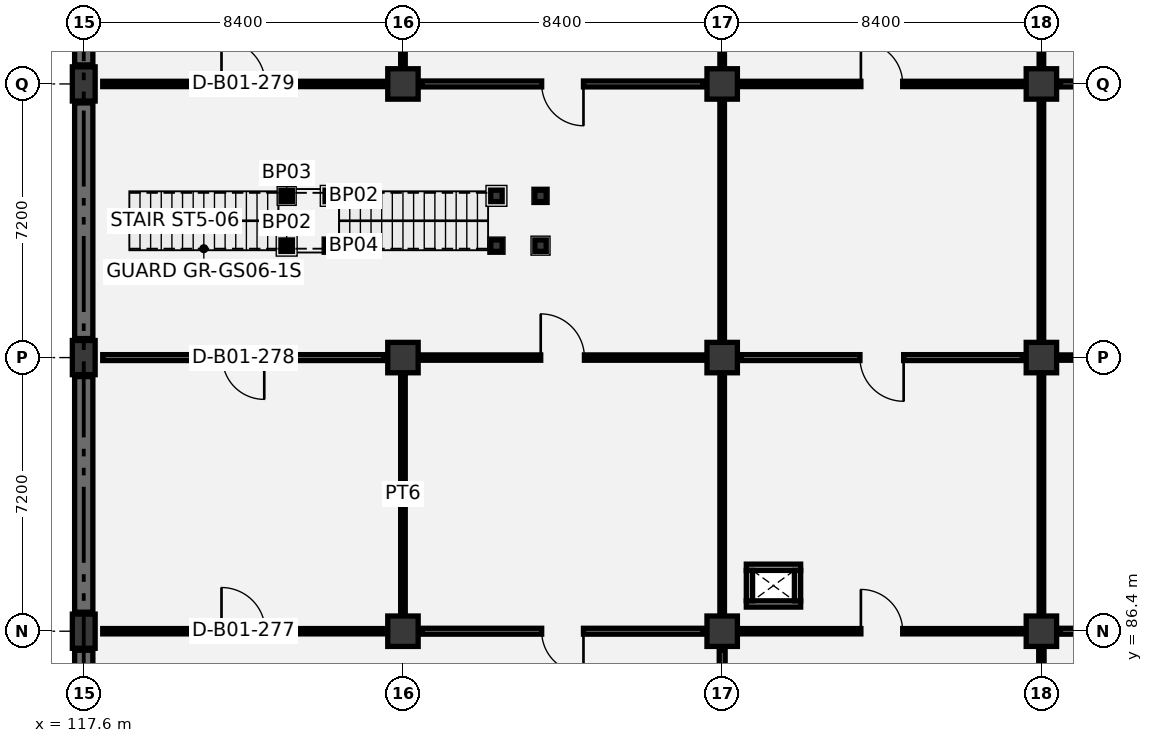
"""IFC4 building model, lengths in metres.
Left out: names, types, materials, properties, quantities, classifications, styles, units other than length and angle.
Written with IfcOpenShell. Run it as: python <this file> out.ifc"""

import sys

from ifc_helpers import new_model, si_unit, direction, frame, frame_2d, origin, origin_2d, place, context, subcontext, project, spatial, rectangle, i_section, extrude, element, fill, save


model = new_model("IFC4")
c1 = context("Model", 3, precision=1e-05, world=origin(), true_north=direction((0.0, 1.0)))
c2 = subcontext(c1, "Body", "Model", "MODEL_VIEW")
j1 = project(units=[si_unit("LENGTHUNIT", "METRE"), si_unit("PLANEANGLEUNIT", "RADIAN")], contexts=[c1])
p1 = place(None, origin())
s1 = spatial("IfcSite", under=j1, at=p1, CompositionType="ELEMENT")
p2 = place(p1, origin())
s2 = spatial("IfcBuilding", under=s1, at=p2, CompositionType="ELEMENT")
p3 = place(p2, frame((0.0, 0.0, -4.8)))
s3 = spatial("IfcBuildingStorey", under=s2, at=p3, CompositionType="ELEMENT", Elevation=-4.8)
for number, where, z_axis, x_axis in (
    (1, (117.6, 86.4, 0.0), (0.0, 0.0, 1.0), (1.0, 0.0, 0.0)),
    (2, (117.6, 93.6, 0.0), (0.0, 0.0, 1.0), (1.0, 0.0, 0.0)),
    (3, (117.6, 100.8, 0.0), (0.0, 0.0, 1.0), (1.0, 0.0, 0.0)),
):
    element("IfcColumn", number, at=place(p3, frame(where, z_axis=z_axis, x_axis=x_axis)), inside=s3, PredefinedType="COLUMN", context=c2, shape_type="SweptSolid", body=[
        extrude(rectangle(XDim=0.6, YDim=0.9, at=origin_2d()), origin(), (0.0, 0.0, 1.0), 4.8),
    ])
for number, where, z_axis, x_axis in (
    (4, (126.0, 86.4, 0.0), (0.0, 0.0, 1.0), (1.0, 0.0, 0.0)),
    (5, (126.0, 93.6, 0.0), (0.0, 0.0, 1.0), (1.0, 0.0, 0.0)),
    (6, (126.0, 100.8, 0.0), (0.0, 0.0, 1.0), (1.0, 0.0, 0.0)),
    (7, (134.4, 86.4, 0.0), (0.0, 0.0, 1.0), (1.0, 0.0, 0.0)),
    (8, (134.4, 93.6, 0.0), (0.0, 0.0, 1.0), (1.0, 0.0, 0.0)),
    (9, (134.4, 100.8, 0.0), (0.0, 0.0, 1.0), (1.0, 0.0, 0.0)),
    (10, (142.8, 86.4, 0.0), (0.0, 0.0, 1.0), (1.0, 0.0, 0.0)),
    (11, (142.8, 93.6, 0.0), (0.0, 0.0, 1.0), (1.0, 0.0, 0.0)),
    (12, (142.8, 100.8, 0.0), (0.0, 0.0, 1.0), (1.0, 0.0, 0.0)),
):
    element("IfcColumn", number, at=place(p3, frame(where, z_axis=z_axis, x_axis=x_axis)), inside=s3, PredefinedType="COLUMN", context=c2, shape_type="SweptSolid", body=[
        extrude(rectangle(XDim=0.8, YDim=0.8, at=origin_2d()), origin(), (0.0, 0.0, 1.0), 4.8),
    ])
for number, where, z_axis, x_axis in (
    (13, (122.94, 96.545, 0.0), (0.0, 0.0, 1.0), (1.0, 0.0, 0.0)),
    (14, (124.1, 96.545, 0.0), (0.0, 0.0, 1.0), (1.0, 0.0, 0.0)),
    (15, (122.94, 97.855, 0.0), (0.0, 0.0, 1.0), (1.0, 0.0, 0.0)),
    (16, (124.1, 97.855, 0.0), (0.0, 0.0, 1.0), (1.0, 0.0, 0.0)),
):
    element("IfcColumn", number, at=place(p3, frame(where, z_axis=z_axis, x_axis=x_axis)), inside=s3, PredefinedType="COLUMN", context=c2, shape_type="SweptSolid", body=[
        extrude(i_section(OverallWidth=0.3, OverallDepth=0.3, WebThickness=0.011, FlangeThickness=0.019, FilletRadius=0.027, at=origin_2d()), origin(), (0.0, 0.0, 1.0), 2.22),
    ])
for number, where, z_axis, x_axis in (
    (17, (128.46, 96.545, 0.0), (0.0, 0.0, 1.0), (1.0, 0.0, 0.0)),
    (18, (129.62, 96.545, 0.0), (0.0, 0.0, 1.0), (1.0, 0.0, 0.0)),
    (19, (128.46, 97.855, 0.0), (0.0, 0.0, 1.0), (1.0, 0.0, 0.0)),
    (20, (129.62, 97.855, 0.0), (0.0, 0.0, 1.0), (1.0, 0.0, 0.0)),
):
    element("IfcColumn", number, at=place(p3, frame(where, z_axis=z_axis, x_axis=x_axis)), inside=s3, PredefinedType="COLUMN", context=c2, shape_type="SweptSolid", body=[
        extrude(i_section(OverallWidth=0.3, OverallDepth=0.3, WebThickness=0.011, FlangeThickness=0.019, FilletRadius=0.027, at=origin_2d()), origin(), (0.0, 0.0, 1.0), 4.6),
    ])
p4 = place(p3, frame((117.6, 79.7, 0.0), z_axis=(0.0, 0.0, 1.0), x_axis=(0.0, 1.0, 0.0)))
e21 = element("IfcWall", 21, at=p4, inside=s3, PredefinedType="USERDEFINED", context=c2, shape_type="SweptSolid", body=[
    extrude(rectangle(XDim=6.2, YDim=0.48, at=frame_2d((3.1, 0.0))), origin(), (0.0, 0.0, 1.0), 4.575),
])
p5 = place(p3, frame((117.6, 86.9, 0.0), z_axis=(0.0, 0.0, 1.0), x_axis=(0.0, 1.0, 0.0)))
e22 = element("IfcWall", 22, at=p5, inside=s3, PredefinedType="USERDEFINED", context=c2, shape_type="SweptSolid", body=[
    extrude(rectangle(XDim=6.2, YDim=0.48, at=frame_2d((3.1, 0.0))), origin(), (0.0, 0.0, 1.0), 4.575),
])
for number, where, z_axis, x_axis in (
    (23, (117.6, 94.1, 0.0), (0.0, 0.0, 1.0), (0.0, 1.0, 0.0)),
    (24, (117.6, 101.3, 0.0), (0.0, 0.0, 1.0), (0.0, 1.0, 0.0)),
):
    element("IfcWall", number, at=place(p3, frame(where, z_axis=z_axis, x_axis=x_axis)), inside=s3, PredefinedType="USERDEFINED", context=c2, shape_type="SweptSolid", body=[
        extrude(rectangle(XDim=6.2, YDim=0.48, at=frame_2d((3.1, 0.0))), origin(), (0.0, 0.0, 1.0), 4.575),
    ])
for number, where, z_axis, x_axis in (
    (25, (135.035, 87.117, 0.0), (0.0, 0.0, 1.0), (1.0, 0.0, 0.0)),
    (26, (135.035, 88.083, 0.0), (0.0, 0.0, 1.0), (1.0, 0.0, 0.0)),
):
    element("IfcWall", number, at=place(p3, frame(where, z_axis=z_axis, x_axis=x_axis)), inside=s3, PredefinedType="PARTITIONING", context=c2, shape_type="SweptSolid", body=[
        extrude(rectangle(XDim=1.43, YDim=0.165, at=frame_2d((0.715, 0.0))), origin(), (0.0, 0.0, 1.0), 4.45),
    ])
for number, where, z_axis, x_axis in (
    (27, (135.117, 87.2, 0.0), (0.0, 0.0, 1.0), (0.0, 1.0, 0.0)),
    (28, (136.383, 87.2, 0.0), (0.0, 0.0, 1.0), (0.0, 1.0, 0.0)),
):
    element("IfcWall", number, at=place(p3, frame(where, z_axis=z_axis, x_axis=x_axis)), inside=s3, PredefinedType="PARTITIONING", context=c2, shape_type="SweptSolid", body=[
        extrude(rectangle(XDim=0.8, YDim=0.165, at=frame_2d((0.4, 0.0))), origin(), (0.0, 0.0, 1.0), 4.45),
    ])
p6 = place(p3, frame((118.1, 86.4, 0.0), z_axis=(0.0, 0.0, 1.0), x_axis=(1.0, 0.0, 0.0)))
e29 = element("IfcWall", 29, at=p6, inside=s3, PredefinedType="PARTITIONING", context=c2, shape_type="SweptSolid", body=[
    extrude(rectangle(XDim=7.4, YDim=0.14, at=frame_2d((3.7, 0.0))), origin(), (0.0, 0.0, 1.0), 3.545),
])
p7 = place(p6, frame((3.125, 0.0, 0.0)))
e30 = element("IfcOpeningElement", 30, at=p7, cuts=e29, PredefinedType="OPENING", context=c2, shape_type="SweptSolid", body=[
    extrude(rectangle(XDim=1.15, YDim=2.1, at=frame_2d((0.575, 1.05))), frame((0.0, 0.08, 0.0), z_axis=(0.0, -1.0, 0.0), x_axis=(1.0, 0.0, 0.0)), (0.0, 0.0, 1.0), 0.16),
])
p8 = place(p3, frame((126.0, 86.9, 0.0), z_axis=(0.0, 0.0, 1.0), x_axis=(0.0, 1.0, 0.0)))
e31 = element("IfcWall", 31, at=p8, inside=s3, PredefinedType="PARTITIONING", context=c2, shape_type="SweptSolid", body=[
    extrude(rectangle(XDim=6.2, YDim=0.12, at=frame_2d((3.1, 0.0))), origin(), (0.0, 0.0, 1.0), 3.645),
])
p9 = place(p3, frame((118.1, 93.6, 0.0), z_axis=(0.0, 0.0, 1.0), x_axis=(1.0, 0.0, 0.0)))
e32 = element("IfcWall", 32, at=p9, inside=s3, PredefinedType="PARTITIONING", context=c2, shape_type="SweptSolid", body=[
    extrude(rectangle(XDim=7.4, YDim=0.155, at=frame_2d((3.7, 0.0))), origin(), (0.0, 0.0, 1.0), 3.545),
])
p10 = place(p9, frame((3.15, 0.0, 0.0)))
e33 = element("IfcOpeningElement", 33, at=p10, cuts=e32, PredefinedType="OPENING", context=c2, shape_type="SweptSolid", body=[
    extrude(rectangle(XDim=1.1, YDim=2.1, at=frame_2d((0.55, 1.05))), frame((0.0, 0.087, 0.0), z_axis=(0.0, -1.0, 0.0), x_axis=(1.0, 0.0, 0.0)), (0.0, 0.0, 1.0), 0.175),
])
p11 = place(p3, frame((118.1, 100.8, 0.0), z_axis=(0.0, 0.0, 1.0), x_axis=(1.0, 0.0, 0.0)))
e34 = element("IfcWall", 34, at=p11, inside=s3, PredefinedType="PARTITIONING", context=c2, shape_type="SweptSolid", body=[
    extrude(rectangle(XDim=7.4, YDim=0.14, at=frame_2d((3.7, 0.0))), origin(), (0.0, 0.0, 1.0), 3.545),
])
p12 = place(p11, frame((3.125, 0.0, 0.0)))
e35 = element("IfcOpeningElement", 35, at=p12, cuts=e34, PredefinedType="OPENING", context=c2, shape_type="SweptSolid", body=[
    extrude(rectangle(XDim=1.15, YDim=2.1, at=frame_2d((0.575, 1.05))), frame((0.0, 0.08, 0.0), z_axis=(0.0, -1.0, 0.0), x_axis=(1.0, 0.0, 0.0)), (0.0, 0.0, 1.0), 0.16),
])
p13 = place(p3, frame((126.0, 101.3, 0.0), z_axis=(0.0, 0.0, 1.0), x_axis=(0.0, 1.0, 0.0)))
e36 = element("IfcWall", 36, at=p13, inside=s3, PredefinedType="PARTITIONING", context=c2, shape_type="SweptSolid", body=[
    extrude(rectangle(XDim=6.2, YDim=0.12, at=frame_2d((3.1, 0.0))), origin(), (0.0, 0.0, 1.0), 3.645),
])
p14 = place(p3, frame((134.4, 79.7, 0.0), z_axis=(0.0, 0.0, 1.0), x_axis=(0.0, 1.0, 0.0)))
e37 = element("IfcWall", 37, at=p14, inside=s3, PredefinedType="PARTITIONING", context=c2, shape_type="SweptSolid", body=[
    extrude(rectangle(XDim=6.2, YDim=0.155, at=frame_2d((3.1, 0.0))), origin(), (0.0, 0.0, 1.0), 3.645),
])
p15 = place(p14, frame((2.525, 0.0, 0.0)))
e38 = element("IfcOpeningElement", 38, at=p15, cuts=e37, PredefinedType="OPENING", context=c2, shape_type="SweptSolid", body=[
    extrude(rectangle(XDim=1.15, YDim=2.1, at=frame_2d((0.575, 1.05))), frame((0.0, 0.087, 0.0), z_axis=(0.0, -1.0, 0.0), x_axis=(1.0, 0.0, 0.0)), (0.0, 0.0, 1.0), 0.175),
])
p16 = place(p3, frame((126.5, 86.4, 0.0), z_axis=(0.0, 0.0, 1.0), x_axis=(1.0, 0.0, 0.0)))
e39 = element("IfcWall", 39, at=p16, inside=s3, PredefinedType="PARTITIONING", context=c2, shape_type="SweptSolid", body=[
    extrude(rectangle(XDim=7.4, YDim=0.155, at=frame_2d((3.7, 0.0))), origin(), (0.0, 0.0, 1.0), 3.545),
])
p17 = place(p16, frame((3.15, 0.0, 0.0)))
e40 = element("IfcOpeningElement", 40, at=p17, cuts=e39, PredefinedType="OPENING", context=c2, shape_type="SweptSolid", body=[
    extrude(rectangle(XDim=1.1, YDim=2.1, at=frame_2d((0.55, 1.05))), frame((0.0, 0.087, 0.0), z_axis=(0.0, -1.0, 0.0), x_axis=(1.0, 0.0, 0.0)), (0.0, 0.0, 1.0), 0.175),
])
p18 = place(p3, frame((134.4, 86.9, 0.0), z_axis=(0.0, 0.0, 1.0), x_axis=(0.0, 1.0, 0.0)))
e41 = element("IfcWall", 41, at=p18, inside=s3, PredefinedType="PARTITIONING", context=c2, shape_type="SweptSolid", body=[
    extrude(rectangle(XDim=6.2, YDim=0.12, at=frame_2d((3.1, 0.0))), origin(), (0.0, 0.0, 1.0), 3.645),
])
p19 = place(p3, frame((126.5, 93.6, 0.0), z_axis=(0.0, 0.0, 1.0), x_axis=(1.0, 0.0, 0.0)))
e42 = element("IfcWall", 42, at=p19, inside=s3, PredefinedType="PARTITIONING", context=c2, shape_type="SweptSolid", body=[
    extrude(rectangle(XDim=7.4, YDim=0.14, at=frame_2d((3.7, 0.0))), origin(), (0.0, 0.0, 1.0), 3.545),
])
p20 = place(p19, frame((3.125, 0.0, 0.0)))
e43 = element("IfcOpeningElement", 43, at=p20, cuts=e42, PredefinedType="OPENING", context=c2, shape_type="SweptSolid", body=[
    extrude(rectangle(XDim=1.15, YDim=2.1, at=frame_2d((0.575, 1.05))), frame((0.0, 0.08, 0.0), z_axis=(0.0, -1.0, 0.0), x_axis=(1.0, 0.0, 0.0)), (0.0, 0.0, 1.0), 0.16),
])
p21 = place(p3, frame((134.4, 94.1, 0.0), z_axis=(0.0, 0.0, 1.0), x_axis=(0.0, 1.0, 0.0)))
e44 = element("IfcWall", 44, at=p21, inside=s3, PredefinedType="PARTITIONING", context=c2, shape_type="SweptSolid", body=[
    extrude(rectangle(XDim=6.2, YDim=0.12, at=frame_2d((3.1, 0.0))), origin(), (0.0, 0.0, 1.0), 3.645),
])
p22 = place(p3, frame((126.5, 100.8, 0.0), z_axis=(0.0, 0.0, 1.0), x_axis=(1.0, 0.0, 0.0)))
e45 = element("IfcWall", 45, at=p22, inside=s3, PredefinedType="PARTITIONING", context=c2, shape_type="SweptSolid", body=[
    extrude(rectangle(XDim=7.4, YDim=0.155, at=frame_2d((3.7, 0.0))), origin(), (0.0, 0.0, 1.0), 3.545),
])
p23 = place(p22, frame((3.15, 0.0, 0.0)))
e46 = element("IfcOpeningElement", 46, at=p23, cuts=e45, PredefinedType="OPENING", context=c2, shape_type="SweptSolid", body=[
    extrude(rectangle(XDim=1.1, YDim=2.1, at=frame_2d((0.55, 1.05))), frame((0.0, 0.087, 0.0), z_axis=(0.0, -1.0, 0.0), x_axis=(1.0, 0.0, 0.0)), (0.0, 0.0, 1.0), 0.175),
])
p24 = place(p3, frame((134.4, 101.3, 0.0), z_axis=(0.0, 0.0, 1.0), x_axis=(0.0, 1.0, 0.0)))
e47 = element("IfcWall", 47, at=p24, inside=s3, PredefinedType="PARTITIONING", context=c2, shape_type="SweptSolid", body=[
    extrude(rectangle(XDim=6.2, YDim=0.12, at=frame_2d((3.1, 0.0))), origin(), (0.0, 0.0, 1.0), 3.645),
])
p25 = place(p3, frame((142.8, 79.7, 0.0), z_axis=(0.0, 0.0, 1.0), x_axis=(0.0, 1.0, 0.0)))
e48 = element("IfcWall", 48, at=p25, inside=s3, PredefinedType="PARTITIONING", context=c2, shape_type="SweptSolid", body=[
    extrude(rectangle(XDim=6.2, YDim=0.14, at=frame_2d((3.1, 0.0))), origin(), (0.0, 0.0, 1.0), 3.645),
])
p26 = place(p25, frame((2.525, 0.0, 0.0)))
e49 = element("IfcOpeningElement", 49, at=p26, cuts=e48, PredefinedType="OPENING", context=c2, shape_type="SweptSolid", body=[
    extrude(rectangle(XDim=1.15, YDim=2.1, at=frame_2d((0.575, 1.05))), frame((0.0, 0.08, 0.0), z_axis=(0.0, -1.0, 0.0), x_axis=(1.0, 0.0, 0.0)), (0.0, 0.0, 1.0), 0.16),
])
p27 = place(p3, frame((134.9, 86.4, 0.0), z_axis=(0.0, 0.0, 1.0), x_axis=(1.0, 0.0, 0.0)))
e50 = element("IfcWall", 50, at=p27, inside=s3, PredefinedType="PARTITIONING", context=c2, shape_type="SweptSolid", body=[
    extrude(rectangle(XDim=7.4, YDim=0.14, at=frame_2d((3.7, 0.0))), origin(), (0.0, 0.0, 1.0), 3.545),
])
p28 = place(p27, frame((3.15, 0.0, 0.0)))
e51 = element("IfcOpeningElement", 51, at=p28, cuts=e50, PredefinedType="OPENING", context=c2, shape_type="SweptSolid", body=[
    extrude(rectangle(XDim=1.1, YDim=2.1, at=frame_2d((0.55, 1.05))), frame((0.0, 0.08, 0.0), z_axis=(0.0, -1.0, 0.0), x_axis=(1.0, 0.0, 0.0)), (0.0, 0.0, 1.0), 0.16),
])
p29 = place(p3, frame((142.8, 86.9, 0.0), z_axis=(0.0, 0.0, 1.0), x_axis=(0.0, 1.0, 0.0)))
e52 = element("IfcWall", 52, at=p29, inside=s3, PredefinedType="PARTITIONING", context=c2, shape_type="SweptSolid", body=[
    extrude(rectangle(XDim=6.2, YDim=0.12, at=frame_2d((3.1, 0.0))), origin(), (0.0, 0.0, 1.0), 3.645),
])
p30 = place(p3, frame((134.9, 93.6, 0.0), z_axis=(0.0, 0.0, 1.0), x_axis=(1.0, 0.0, 0.0)))
e53 = element("IfcWall", 53, at=p30, inside=s3, PredefinedType="PARTITIONING", context=c2, shape_type="SweptSolid", body=[
    extrude(rectangle(XDim=7.4, YDim=0.155, at=frame_2d((3.7, 0.0))), origin(), (0.0, 0.0, 1.0), 3.545),
])
p31 = place(p30, frame((3.125, 0.0, 0.0)))
e54 = element("IfcOpeningElement", 54, at=p31, cuts=e53, PredefinedType="OPENING", context=c2, shape_type="SweptSolid", body=[
    extrude(rectangle(XDim=1.15, YDim=2.1, at=frame_2d((0.575, 1.05))), frame((0.0, 0.087, 0.0), z_axis=(0.0, -1.0, 0.0), x_axis=(1.0, 0.0, 0.0)), (0.0, 0.0, 1.0), 0.175),
])
p32 = place(p3, frame((142.8, 94.1, 0.0), z_axis=(0.0, 0.0, 1.0), x_axis=(0.0, 1.0, 0.0)))
e55 = element("IfcWall", 55, at=p32, inside=s3, PredefinedType="PARTITIONING", context=c2, shape_type="SweptSolid", body=[
    extrude(rectangle(XDim=6.2, YDim=0.12, at=frame_2d((3.1, 0.0))), origin(), (0.0, 0.0, 1.0), 3.645),
])
p33 = place(p3, frame((134.9, 100.8, 0.0), z_axis=(0.0, 0.0, 1.0), x_axis=(1.0, 0.0, 0.0)))
e56 = element("IfcWall", 56, at=p33, inside=s3, PredefinedType="PARTITIONING", context=c2, shape_type="SweptSolid", body=[
    extrude(rectangle(XDim=7.4, YDim=0.14, at=frame_2d((3.7, 0.0))), origin(), (0.0, 0.0, 1.0), 3.545),
])
p34 = place(p33, frame((3.15, 0.0, 0.0)))
e57 = element("IfcOpeningElement", 57, at=p34, cuts=e56, PredefinedType="OPENING", context=c2, shape_type="SweptSolid", body=[
    extrude(rectangle(XDim=1.1, YDim=2.1, at=frame_2d((0.55, 1.05))), frame((0.0, 0.08, 0.0), z_axis=(0.0, -1.0, 0.0), x_axis=(1.0, 0.0, 0.0)), (0.0, 0.0, 1.0), 0.16),
])
p35 = place(p3, frame((142.8, 101.3, 0.0), z_axis=(0.0, 0.0, 1.0), x_axis=(0.0, 1.0, 0.0)))
e58 = element("IfcWall", 58, at=p35, inside=s3, PredefinedType="PARTITIONING", context=c2, shape_type="SweptSolid", body=[
    extrude(rectangle(XDim=6.2, YDim=0.12, at=frame_2d((3.1, 0.0))), origin(), (0.0, 0.0, 1.0), 3.645),
])
p36 = place(p3, frame((143.3, 86.4, 0.0), z_axis=(0.0, 0.0, 1.0), x_axis=(1.0, 0.0, 0.0)))
e59 = element("IfcWall", 59, at=p36, inside=s3, PredefinedType="PARTITIONING", context=c2, shape_type="SweptSolid", body=[
    extrude(rectangle(XDim=7.4, YDim=0.155, at=frame_2d((3.7, 0.0))), origin(), (0.0, 0.0, 1.0), 3.545),
])
p37 = place(p36, frame((3.15, 0.0, 0.0)))
e60 = element("IfcOpeningElement", 60, at=p37, cuts=e59, PredefinedType="OPENING", context=c2, shape_type="SweptSolid", body=[
    extrude(rectangle(XDim=1.1, YDim=2.1, at=frame_2d((0.55, 1.05))), frame((0.0, 0.087, 0.0), z_axis=(0.0, -1.0, 0.0), x_axis=(1.0, 0.0, 0.0)), (0.0, 0.0, 1.0), 0.175),
])
p38 = place(p3, frame((143.3, 93.6, 0.0), z_axis=(0.0, 0.0, 1.0), x_axis=(1.0, 0.0, 0.0)))
e61 = element("IfcWall", 61, at=p38, inside=s3, PredefinedType="PARTITIONING", context=c2, shape_type="SweptSolid", body=[
    extrude(rectangle(XDim=7.4, YDim=0.14, at=frame_2d((3.7, 0.0))), origin(), (0.0, 0.0, 1.0), 3.545),
])
p39 = place(p38, frame((3.125, 0.0, 0.0)))
e62 = element("IfcOpeningElement", 62, at=p39, cuts=e61, PredefinedType="OPENING", context=c2, shape_type="SweptSolid", body=[
    extrude(rectangle(XDim=1.15, YDim=2.1, at=frame_2d((0.575, 1.05))), frame((0.0, 0.08, 0.0), z_axis=(0.0, -1.0, 0.0), x_axis=(1.0, 0.0, 0.0)), (0.0, 0.0, 1.0), 0.16),
])
p40 = place(p3, frame((143.3, 100.8, 0.0), z_axis=(0.0, 0.0, 1.0), x_axis=(1.0, 0.0, 0.0)))
e63 = element("IfcWall", 63, at=p40, inside=s3, PredefinedType="PARTITIONING", context=c2, shape_type="SweptSolid", body=[
    extrude(rectangle(XDim=7.4, YDim=0.155, at=frame_2d((3.7, 0.0))), origin(), (0.0, 0.0, 1.0), 3.545),
])
p41 = place(p40, frame((3.15, 0.0, 0.0)))
e64 = element("IfcOpeningElement", 64, at=p41, cuts=e63, PredefinedType="OPENING", context=c2, shape_type="SweptSolid", body=[
    extrude(rectangle(XDim=1.1, YDim=2.1, at=frame_2d((0.55, 1.05))), frame((0.0, 0.087, 0.0), z_axis=(0.0, -1.0, 0.0), x_axis=(1.0, 0.0, 0.0)), (0.0, 0.0, 1.0), 0.175),
])
p42 = place(p7, origin())
e65 = element("IfcDoor", 65, at=p42, inside=s3, OperationType="SINGLE_SWING_LEFT", PredefinedType="DOOR", context=c2, shape_type="SweptSolid", body=[
    extrude(rectangle(XDim=1.15, YDim=2.1, at=frame_2d((0.575, 1.05))), frame((0.0, 0.025, 0.0), z_axis=(0.0, -1.0, 0.0), x_axis=(1.0, 0.0, 0.0)), (0.0, 0.0, 1.0), 0.05),
])
fill(e30, e65)
p43 = place(p10, frame((1.1, 0.0, 0.0), z_axis=(0.0, 0.0, 1.0), x_axis=(-1.0, 0.0, 0.0)))
e66 = element("IfcDoor", 66, at=p43, inside=s3, OperationType="SINGLE_SWING_LEFT", PredefinedType="DOOR", context=c2, shape_type="SweptSolid", body=[
    extrude(rectangle(XDim=1.1, YDim=2.1, at=frame_2d((0.55, 1.05))), frame((0.0, 0.025, 0.0), z_axis=(0.0, -1.0, 0.0), x_axis=(1.0, 0.0, 0.0)), (0.0, 0.0, 1.0), 0.05),
])
fill(e33, e66)
p44 = place(p12, origin())
e67 = element("IfcDoor", 67, at=p44, inside=s3, OperationType="SINGLE_SWING_LEFT", PredefinedType="DOOR", context=c2, shape_type="SweptSolid", body=[
    extrude(rectangle(XDim=1.15, YDim=2.1, at=frame_2d((0.575, 1.05))), frame((0.0, 0.025, 0.0), z_axis=(0.0, -1.0, 0.0), x_axis=(1.0, 0.0, 0.0)), (0.0, 0.0, 1.0), 0.05),
])
fill(e35, e67)
p45 = place(p17, frame((1.1, 0.0, 0.0), z_axis=(0.0, 0.0, 1.0), x_axis=(-1.0, 0.0, 0.0)))
e68 = element("IfcDoor", 68, at=p45, inside=s3, OperationType="SINGLE_SWING_LEFT", PredefinedType="DOOR", context=c2, shape_type="SweptSolid", body=[
    extrude(rectangle(XDim=1.1, YDim=2.1, at=frame_2d((0.55, 1.05))), frame((0.0, 0.025, 0.0), z_axis=(0.0, -1.0, 0.0), x_axis=(1.0, 0.0, 0.0)), (0.0, 0.0, 1.0), 0.05),
])
fill(e40, e68)
p46 = place(p20, origin())
e69 = element("IfcDoor", 69, at=p46, inside=s3, OperationType="SINGLE_SWING_LEFT", PredefinedType="DOOR", context=c2, shape_type="SweptSolid", body=[
    extrude(rectangle(XDim=1.15, YDim=2.1, at=frame_2d((0.575, 1.05))), frame((0.0, 0.025, 0.0), z_axis=(0.0, -1.0, 0.0), x_axis=(1.0, 0.0, 0.0)), (0.0, 0.0, 1.0), 0.05),
])
fill(e43, e69)
p47 = place(p23, frame((1.1, 0.0, 0.0), z_axis=(0.0, 0.0, 1.0), x_axis=(-1.0, 0.0, 0.0)))
e70 = element("IfcDoor", 70, at=p47, inside=s3, OperationType="SINGLE_SWING_LEFT", PredefinedType="DOOR", context=c2, shape_type="SweptSolid", body=[
    extrude(rectangle(XDim=1.1, YDim=2.1, at=frame_2d((0.55, 1.05))), frame((0.0, 0.025, 0.0), z_axis=(0.0, -1.0, 0.0), x_axis=(1.0, 0.0, 0.0)), (0.0, 0.0, 1.0), 0.05),
])
fill(e46, e70)
p48 = place(p28, origin())
e71 = element("IfcDoor", 71, at=p48, inside=s3, OperationType="SINGLE_SWING_LEFT", PredefinedType="DOOR", context=c2, shape_type="SweptSolid", body=[
    extrude(rectangle(XDim=1.1, YDim=2.1, at=frame_2d((0.55, 1.05))), frame((0.0, 0.025, 0.0), z_axis=(0.0, -1.0, 0.0), x_axis=(1.0, 0.0, 0.0)), (0.0, 0.0, 1.0), 0.05),
])
fill(e51, e71)
p49 = place(p31, frame((1.15, 0.0, 0.0), z_axis=(0.0, 0.0, 1.0), x_axis=(-1.0, 0.0, 0.0)))
e72 = element("IfcDoor", 72, at=p49, inside=s3, OperationType="SINGLE_SWING_LEFT", PredefinedType="DOOR", context=c2, shape_type="SweptSolid", body=[
    extrude(rectangle(XDim=1.15, YDim=2.1, at=frame_2d((0.575, 1.05))), frame((0.0, 0.025, 0.0), z_axis=(0.0, -1.0, 0.0), x_axis=(1.0, 0.0, 0.0)), (0.0, 0.0, 1.0), 0.05),
])
fill(e54, e72)
p50 = place(p34, origin())
e73 = element("IfcDoor", 73, at=p50, inside=s3, OperationType="SINGLE_SWING_LEFT", PredefinedType="DOOR", context=c2, shape_type="SweptSolid", body=[
    extrude(rectangle(XDim=1.1, YDim=2.1, at=frame_2d((0.55, 1.05))), frame((0.0, 0.025, 0.0), z_axis=(0.0, -1.0, 0.0), x_axis=(1.0, 0.0, 0.0)), (0.0, 0.0, 1.0), 0.05),
])
fill(e57, e73)
save(model, sys.argv[1])
